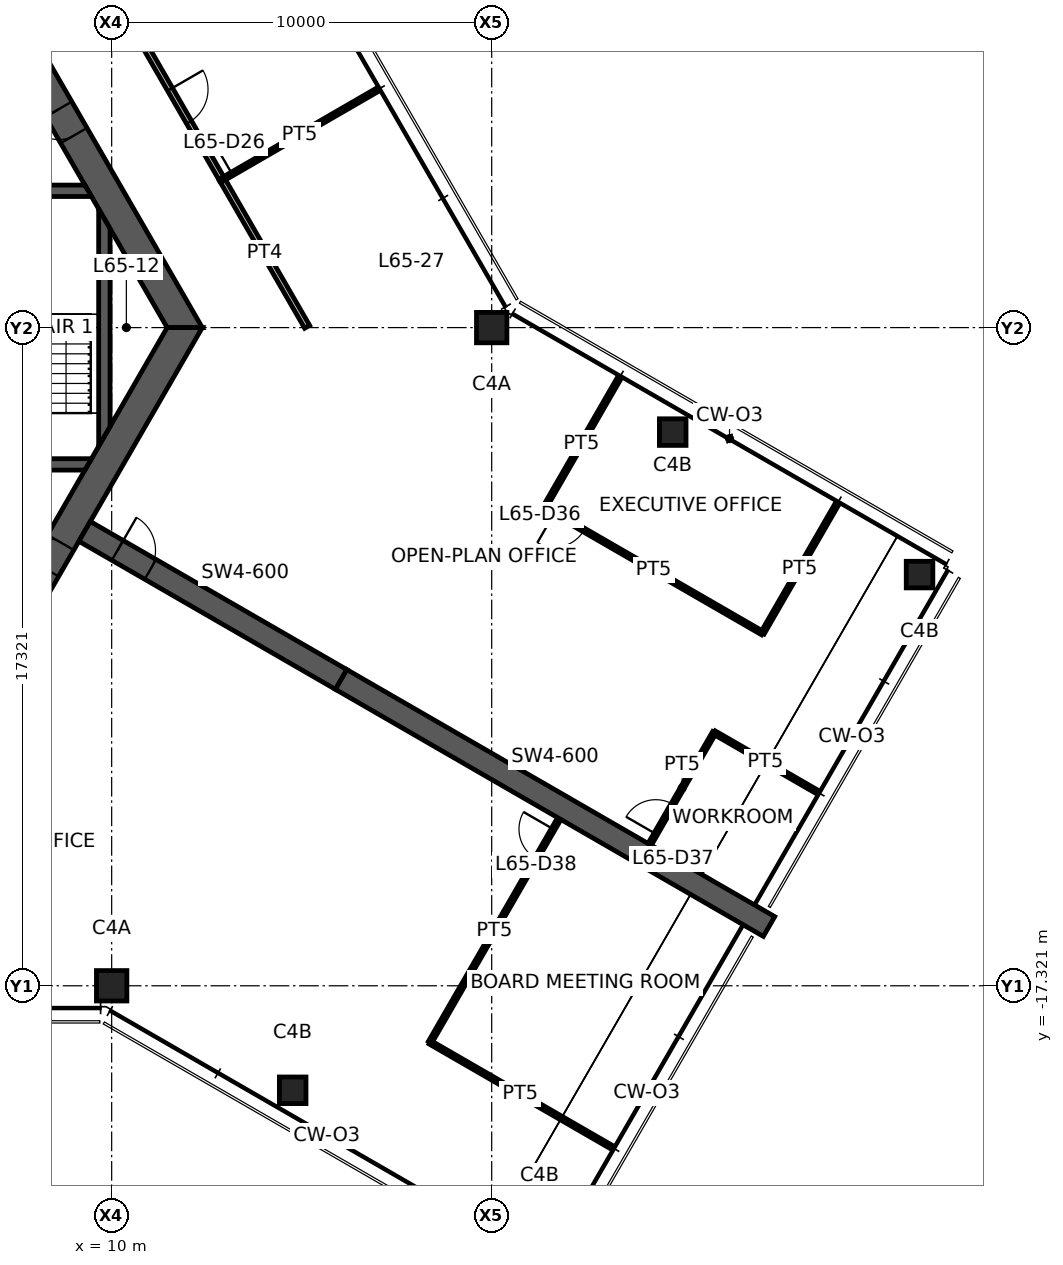
"""IFC4 building model, lengths in metres.
Left out: names, types, materials, properties, quantities, classifications, styles, units other than length and angle.
Written with IfcOpenShell. Run it as: python <this file> out.ifc"""

import sys

from ifc_helpers import new_model, si_unit, direction, frame, frame_2d, origin, origin_2d, place, context, subcontext, project, spatial, polyline, rectangle, hollow_rectangle, outline, extrude, element, fill, save


model = new_model("IFC4")
c1 = context("Model", 3, precision=1e-05, world=origin(), true_north=direction((0.0, 1.0)))
c2 = subcontext(c1, "Body", "Model", "MODEL_VIEW")
j1 = project(units=[si_unit("LENGTHUNIT", "METRE"), si_unit("PLANEANGLEUNIT", "RADIAN")], contexts=[c1])
p1 = place(None, origin())
s1 = spatial("IfcSite", under=j1, at=p1, CompositionType="ELEMENT")
p2 = place(p1, origin())
s2 = spatial("IfcBuilding", under=s1, at=p2, CompositionType="ELEMENT")
p3 = place(p2, frame((0.0, 0.0, 259.6)))
s3 = spatial("IfcBuildingStorey", under=s2, at=p3, CompositionType="ELEMENT", Elevation=259.6)
for number, where, z_axis, x_axis in (
    (1, (20.0, 0.0, 0.0), (0.0, 0.0, 1.0), (1.0, 0.0, 0.0)),
    (2, (10.0, -17.321, 0.0), (0.0, 0.0, 1.0), (1.0, 0.0, 0.0)),
):
    element("IfcColumn", number, at=place(p3, frame(where, z_axis=z_axis, x_axis=x_axis)), inside=s3, PredefinedType="COLUMN", context=c2, shape_type="SweptSolid", body=[
        extrude(hollow_rectangle(XDim=0.8, YDim=0.8, WallThickness=0.04, at=origin_2d()), origin(), (0.0, 0.0, 1.0), 3.9),
    ])
for number, where, z_axis, x_axis in (
    (3, (14.763, -20.071, 0.0), (0.0, 0.0, 1.0), (1.0, 0.0, 0.0)),
    (4, (24.763, -2.75, 0.0), (0.0, 0.0, 1.0), (1.0, 0.0, 0.0)),
    (5, (31.258, -6.5, 0.0), (0.0, 0.0, 1.0), (1.0, 0.0, 0.0)),
):
    element("IfcColumn", number, at=place(p3, frame(where, z_axis=z_axis, x_axis=x_axis)), inside=s3, PredefinedType="COLUMN", context=c2, shape_type="SweptSolid", body=[
        extrude(hollow_rectangle(XDim=0.7, YDim=0.7, WallThickness=0.032, at=origin_2d()), origin(), (0.0, 0.0, 1.0), 3.9),
    ])
p4 = place(p3, frame((11.922, 0.0, 0.0), z_axis=(0.0, 0.0, 1.0), x_axis=(-0.500004296715, 0.866022923061, 0.0)))
e6 = element("IfcWall", 6, at=p4, inside=s3, PredefinedType="SHEAR", context=c2, shape_type="SweptSolid", body=[
    extrude(outline(polyline([(-0.231, -0.4), (5.835, -0.4), (6.635, -0.4), (12.153, -0.4), (11.691, 0.4), (6.635, 0.4), (5.835, 0.4), (0.231, 0.4), (-0.231, -0.4)])), origin(), (0.0, 0.0, 1.0), 3.9),
])
p5 = place(p4, frame((5.835, 0.0, 0.0)))
e7 = element("IfcOpeningElement", 7, at=p5, cuts=e6, PredefinedType="OPENING", context=c2, shape_type="SweptSolid", body=[
    extrude(rectangle(XDim=0.8, YDim=2.1, at=frame_2d((0.4, 1.05))), frame((0.0, 0.41, 0.0), z_axis=(0.0, -1.0, 0.0), x_axis=(1.0, 0.0, 0.0)), (0.0, 0.0, 1.0), 0.82),
])
p6 = place(p3, frame((5.961, -10.325, 0.0), z_axis=(0.0, 0.0, 1.0), x_axis=(0.500004296715, 0.866022923061, 0.0)))
e8 = element("IfcWall", 8, at=p6, inside=s3, PredefinedType="SHEAR", context=c2, shape_type="SweptSolid", body=[
    extrude(outline(polyline([(-0.231, -0.4), (4.594, -0.4), (5.394, -0.4), (12.153, -0.4), (11.691, 0.4), (5.394, 0.4), (4.594, 0.4), (0.231, 0.4), (-0.231, -0.4)])), origin(), (0.0, 0.0, 1.0), 3.9),
])
p7 = place(p6, frame((4.594, 0.0, 0.0)))
e9 = element("IfcOpeningElement", 9, at=p7, cuts=e8, PredefinedType="OPENING", context=c2, shape_type="SweptSolid", body=[
    extrude(rectangle(XDim=0.8, YDim=2.1, at=frame_2d((0.4, 1.05))), frame((0.0, 0.41, 0.0), z_axis=(0.0, -1.0, 0.0), x_axis=(1.0, 0.0, 0.0)), (0.0, 0.0, 1.0), 0.82),
])
p8 = place(p3, frame((9.288, -5.363, 0.0), z_axis=(0.0, 0.0, 1.0), x_axis=(0.866031736626, -0.499989031036, 0.0)))
e10 = element("IfcWall", 10, at=p8, inside=s3, PredefinedType="SHEAR", context=c2, shape_type="SweptSolid", body=[
    extrude(rectangle(XDim=7.796, YDim=0.6, at=frame_2d((3.898, 0.0))), origin(), (0.0, 0.0, 1.0), 3.9),
])
p9 = place(p8, frame((1.0, 0.0, 0.0)))
e11 = element("IfcOpeningElement", 11, at=p9, cuts=e10, PredefinedType="OPENING", context=c2, shape_type="SweptSolid", body=[
    extrude(rectangle(XDim=1.0, YDim=2.1, at=frame_2d((0.5, 1.05))), frame((0.0, 0.31, 0.0), z_axis=(0.0, -1.0, 0.0), x_axis=(1.0, 0.0, 0.0)), (0.0, 0.0, 1.0), 0.62),
])
p10 = place(p3, frame((16.039, -9.26, 0.0), z_axis=(0.0, 0.0, 1.0), x_axis=(0.866024837091, -0.50000098154, 0.0)))
e12 = element("IfcWall", 12, at=p10, inside=s3, PredefinedType="SHEAR", context=c2, shape_type="SweptSolid", body=[
    extrude(rectangle(XDim=13.0, YDim=0.6, at=frame_2d((6.5, 0.0))), origin(), (0.0, 0.0, 1.0), 3.9),
])
p11 = place(p3, frame((1.45, 3.6, 0.0), z_axis=(0.0, 0.0, 1.0), x_axis=(1.0, 0.0, 0.0)))
e13 = element("IfcWall", 13, at=p11, inside=s3, PredefinedType="SHEAR", context=c2, shape_type="SweptSolid", body=[
    extrude(outline(polyline([(0.0, -0.15), (1.15, -0.15), (2.05, -0.15), (3.4, -0.15), (4.7, -0.15), (8.019, -0.15), (7.845, 0.15), (4.7, 0.15), (3.4, 0.15), (2.05, 0.15), (1.15, 0.15), (0.0, 0.15), (0.0, -0.15)])), origin(), (0.0, 0.0, 1.0), 3.9),
])
p12 = place(p11, frame((1.15, 0.0, 0.0)))
e14 = element("IfcOpeningElement", 14, at=p12, cuts=e13, PredefinedType="OPENING", context=c2, shape_type="SweptSolid", body=[
    extrude(rectangle(XDim=0.9, YDim=2.1, at=frame_2d((0.45, 1.05))), frame((0.0, 0.16, 0.0), z_axis=(0.0, -1.0, 0.0), x_axis=(1.0, 0.0, 0.0)), (0.0, 0.0, 1.0), 0.32),
])
p13 = place(p11, frame((3.4, 0.0, 0.0)))
e15 = element("IfcOpeningElement", 15, at=p13, cuts=e13, PredefinedType="OPENING", context=c2, shape_type="SweptSolid", body=[
    extrude(rectangle(XDim=1.3, YDim=2.1, at=frame_2d((0.65, 1.05))), frame((0.0, 0.16, 0.0), z_axis=(0.0, -1.0, 0.0), x_axis=(1.0, 0.0, 0.0)), (0.0, 0.0, 1.0), 0.32),
])
p14 = place(p3, frame((1.45, -3.6, 0.0), z_axis=(0.0, 0.0, 1.0), x_axis=(1.0, 0.0, 0.0)))
e16 = element("IfcWall", 16, at=p14, inside=s3, PredefinedType="SHEAR", context=c2, shape_type="SweptSolid", body=[
    extrude(outline(polyline([(0.0, -0.15), (1.05, -0.15), (2.15, -0.15), (7.845, -0.15), (8.019, 0.15), (2.15, 0.15), (1.05, 0.15), (0.0, 0.15), (0.0, -0.15)])), origin(), (0.0, 0.0, 1.0), 3.9),
])
p15 = place(p14, frame((1.05, 0.0, 0.0)))
e17 = element("IfcOpeningElement", 17, at=p15, cuts=e16, PredefinedType="OPENING", context=c2, shape_type="SweptSolid", body=[
    extrude(rectangle(XDim=1.1, YDim=2.1, at=frame_2d((0.55, 1.05))), frame((0.0, 0.16, 0.0), z_axis=(0.0, -1.0, 0.0), x_axis=(1.0, 0.0, 0.0)), (0.0, 0.0, 1.0), 0.32),
])
p16 = place(p3, frame((9.808, -2.862, 0.0), z_axis=(0.0, 0.0, 1.0), x_axis=(0.0, 1.0, 0.0)))
e18 = element("IfcWall", 18, at=p16, inside=s3, PredefinedType="SHEAR", context=c2, shape_type="SweptSolid", body=[
    extrude(outline(polyline([(0.26, -0.15), (5.465, -0.15), (5.984, 0.15), (-0.26, 0.15), (0.26, -0.15)])), origin(), (0.0, 0.0, 1.0), 3.9),
])
p17 = place(p3, frame((12.903, 3.902, 0.0), z_axis=(0.0, 0.0, 1.0), x_axis=(0.499964488425, -0.866045905431, 0.0)))
e19 = element("IfcWall", 19, at=p17, inside=s3, PredefinedType="PARTITIONING", context=c2, shape_type="SweptSolid", body=[
    extrude(rectangle(XDim=4.482, YDim=0.15, at=frame_2d((2.241, 0.0))), origin(), (0.0, 0.0, 1.0), 2.95),
])
p18 = place(p3, frame((10.664, 7.779, 0.0), z_axis=(0.0, 0.0, 1.0), x_axis=(0.500001951578, -0.866024277037, 0.0)))
e20 = element("IfcWall", 20, at=p18, inside=s3, PredefinedType="PARTITIONING", context=c2, shape_type="SweptSolid", body=[
    extrude(rectangle(XDim=4.486, YDim=0.15, at=frame_2d((2.243, 0.0))), origin(), (0.0, 0.0, 1.0), 2.95),
])
p19 = place(p18, frame((1.743, 0.0, 0.0)))
e21 = element("IfcOpeningElement", 21, at=p19, cuts=e20, PredefinedType="OPENING", context=c2, shape_type="SweptSolid", body=[
    extrude(rectangle(XDim=1.0, YDim=2.1, at=frame_2d((0.5, 1.05))), frame((0.0, 0.085, 0.0), z_axis=(0.0, -1.0, 0.0), x_axis=(1.0, 0.0, 0.0)), (0.0, 0.0, 1.0), 0.17),
])
p20 = place(p3, frame((12.907, 3.894, 0.0), z_axis=(0.0, 0.0, 1.0), x_axis=(0.86555176604, 0.500819468776, 0.0)))
e22 = element("IfcWall", 22, at=p20, inside=s3, PredefinedType="PARTITIONING", context=c2, shape_type="SweptSolid", body=[
    extrude(rectangle(XDim=4.706, YDim=0.1, at=frame_2d((2.353, 0.0))), origin(), (0.0, 0.0, 1.0), 2.95),
])
p21 = place(p20, frame((0.3, 0.0, 0.0)))
e23 = element("IfcOpeningElement", 23, at=p21, cuts=e22, PredefinedType="OPENING", context=c2, shape_type="SweptSolid", body=[
    extrude(rectangle(XDim=0.9, YDim=2.1, at=frame_2d((0.45, 1.05))), frame((0.0, 0.06, 0.0), z_axis=(0.0, -1.0, 0.0), x_axis=(1.0, 0.0, 0.0)), (0.0, 0.0, 1.0), 0.12),
])
p22 = place(p3, frame((21.392, -4.73, 0.0), z_axis=(0.0, 0.0, 1.0), x_axis=(0.500043804875, 0.866000111551, 0.0)))
e24 = element("IfcWall", 24, at=p22, inside=s3, PredefinedType="PARTITIONING", context=c2, shape_type="SweptSolid", body=[
    extrude(rectangle(XDim=3.88, YDim=0.1, at=frame_2d((1.94, 0.0))), origin(), (0.0, 0.0, 1.0), 2.95),
])
p23 = place(p3, frame((27.125, -8.04, 0.0), z_axis=(0.0, 0.0, 1.0), x_axis=(-0.866030817826, 0.499990622488, 0.0)))
e25 = element("IfcWall", 25, at=p23, inside=s3, PredefinedType="PARTITIONING", context=c2, shape_type="SweptSolid", body=[
    extrude(rectangle(XDim=6.62, YDim=0.1, at=frame_2d((3.31, 0.0))), origin(), (0.0, 0.0, 1.0), 2.95),
])
p24 = place(p23, frame((5.42, 0.0, 0.0)))
e26 = element("IfcOpeningElement", 26, at=p24, cuts=e25, PredefinedType="OPENING", context=c2, shape_type="SweptSolid", body=[
    extrude(rectangle(XDim=0.9, YDim=2.1, at=frame_2d((0.45, 1.05))), frame((0.0, 0.06, 0.0), z_axis=(0.0, -1.0, 0.0), x_axis=(1.0, 0.0, 0.0)), (0.0, 0.0, 1.0), 0.12),
])
p25 = place(p3, frame((29.08, -4.653, 0.0), z_axis=(0.0, 0.0, 1.0), x_axis=(-0.500007107024, -0.866021300503, 0.0)))
e27 = element("IfcWall", 27, at=p25, inside=s3, PredefinedType="PARTITIONING", context=c2, shape_type="SweptSolid", body=[
    extrude(rectangle(XDim=3.91, YDim=0.1, at=frame_2d((1.955, 0.0))), origin(), (0.0, 0.0, 1.0), 2.95),
])
p26 = place(p3, frame((24.167, -13.583, 0.0), z_axis=(0.0, 0.0, 1.0), x_axis=(0.500007997579, 0.866020786331, 0.0)))
e28 = element("IfcWall", 28, at=p26, inside=s3, PredefinedType="PARTITIONING", context=c2, shape_type="SweptSolid", body=[
    extrude(rectangle(XDim=3.38, YDim=0.1, at=frame_2d((1.69, 0.0))), origin(), (0.0, 0.0, 1.0), 2.95),
])
p27 = place(p26, frame((0.3, 0.0, 0.0)))
e29 = element("IfcOpeningElement", 29, at=p27, cuts=e28, PredefinedType="OPENING", context=c2, shape_type="SweptSolid", body=[
    extrude(rectangle(XDim=0.9, YDim=2.1, at=frame_2d((0.45, 1.05))), frame((0.0, 0.06, 0.0), z_axis=(0.0, -1.0, 0.0), x_axis=(1.0, 0.0, 0.0)), (0.0, 0.0, 1.0), 0.12),
])
p28 = place(p3, frame((25.857, -10.656, 0.0), z_axis=(0.0, 0.0, 1.0), x_axis=(0.866036558865, -0.499980678337, 0.0)))
e30 = element("IfcWall", 30, at=p28, inside=s3, PredefinedType="PARTITIONING", context=c2, shape_type="SweptSolid", body=[
    extrude(rectangle(XDim=3.11, YDim=0.1, at=frame_2d((1.555, 0.0))), origin(), (0.0, 0.0, 1.0), 2.95),
])
p29 = place(p3, frame((18.378, -18.809, 0.0), z_axis=(0.0, 0.0, 1.0), x_axis=(0.500019607421, 0.866014083139, 0.0)))
e31 = element("IfcWall", 31, at=p29, inside=s3, PredefinedType="PARTITIONING", context=c2, shape_type="SweptSolid", body=[
    extrude(rectangle(XDim=6.78, YDim=0.1, at=frame_2d((3.39, 0.0))), origin(), (0.0, 0.0, 1.0), 2.95),
])
p30 = place(p29, frame((5.58, 0.0, 0.0)))
e32 = element("IfcOpeningElement", 32, at=p30, cuts=e31, PredefinedType="OPENING", context=c2, shape_type="SweptSolid", body=[
    extrude(rectangle(XDim=0.9, YDim=2.1, at=frame_2d((0.45, 1.05))), frame((0.0, 0.06, 0.0), z_axis=(0.0, -1.0, 0.0), x_axis=(1.0, 0.0, 0.0)), (0.0, 0.0, 1.0), 0.12),
])
p31 = place(p3, frame((23.124, -21.549, 0.0), z_axis=(0.0, 0.0, 1.0), x_axis=(-0.866027562125, 0.499996261625, 0.0)))
e33 = element("IfcWall", 33, at=p31, inside=s3, PredefinedType="PARTITIONING", context=c2, shape_type="SweptSolid", body=[
    extrude(rectangle(XDim=5.48, YDim=0.1, at=frame_2d((2.74, 0.0))), origin(), (0.0, 0.0, 1.0), 2.95),
])
p32 = place(p5, origin())
e34 = element("IfcDoor", 34, at=p32, inside=s3, OperationType="SINGLE_SWING_RIGHT", PredefinedType="DOOR", context=c2, shape_type="SweptSolid", body=[
    extrude(rectangle(XDim=0.8, YDim=2.1, at=frame_2d((0.4, 1.05))), frame((0.0, 0.025, 0.0), z_axis=(0.0, -1.0, 0.0), x_axis=(1.0, 0.0, 0.0)), (0.0, 0.0, 1.0), 0.05),
])
fill(e7, e34)
p33 = place(p7, origin())
e35 = element("IfcDoor", 35, at=p33, inside=s3, OperationType="SINGLE_SWING_LEFT", PredefinedType="DOOR", context=c2, shape_type="SweptSolid", body=[
    extrude(rectangle(XDim=0.8, YDim=2.1, at=frame_2d((0.4, 1.05))), frame((0.0, 0.025, 0.0), z_axis=(0.0, -1.0, 0.0), x_axis=(1.0, 0.0, 0.0)), (0.0, 0.0, 1.0), 0.05),
])
fill(e9, e35)
p34 = place(p9, origin())
e36 = element("IfcDoor", 36, at=p34, inside=s3, OperationType="SINGLE_SWING_LEFT", PredefinedType="DOOR", context=c2, shape_type="SweptSolid", body=[
    extrude(rectangle(XDim=1.0, YDim=2.1, at=frame_2d((0.5, 1.05))), frame((0.0, 0.025, 0.0), z_axis=(0.0, -1.0, 0.0), x_axis=(1.0, 0.0, 0.0)), (0.0, 0.0, 1.0), 0.05),
])
fill(e11, e36)
p35 = place(p19, origin())
e37 = element("IfcDoor", 37, at=p35, inside=s3, OperationType="SINGLE_SWING_LEFT", PredefinedType="DOOR", context=c2, shape_type="SweptSolid", body=[
    extrude(rectangle(XDim=1.0, YDim=2.1, at=frame_2d((0.5, 1.05))), frame((0.0, 0.025, 0.0), z_axis=(0.0, -1.0, 0.0), x_axis=(1.0, 0.0, 0.0)), (0.0, 0.0, 1.0), 0.05),
])
fill(e21, e37)
p36 = place(p21, origin())
e38 = element("IfcDoor", 38, at=p36, inside=s3, OperationType="SINGLE_SWING_LEFT", PredefinedType="DOOR", context=c2, shape_type="SweptSolid", body=[
    extrude(rectangle(XDim=0.9, YDim=2.1, at=frame_2d((0.45, 1.05))), frame((0.0, 0.025, 0.0), z_axis=(0.0, -1.0, 0.0), x_axis=(1.0, 0.0, 0.0)), (0.0, 0.0, 1.0), 0.05),
])
fill(e23, e38)
p37 = place(p24, origin())
e39 = element("IfcDoor", 39, at=p37, inside=s3, OperationType="SINGLE_SWING_RIGHT", PredefinedType="DOOR", context=c2, shape_type="SweptSolid", body=[
    extrude(rectangle(XDim=0.9, YDim=2.1, at=frame_2d((0.45, 1.05))), frame((0.0, 0.025, 0.0), z_axis=(0.0, -1.0, 0.0), x_axis=(1.0, 0.0, 0.0)), (0.0, 0.0, 1.0), 0.05),
])
fill(e26, e39)
p38 = place(p27, origin())
e40 = element("IfcDoor", 40, at=p38, inside=s3, OperationType="SINGLE_SWING_LEFT", PredefinedType="DOOR", context=c2, shape_type="SweptSolid", body=[
    extrude(rectangle(XDim=0.9, YDim=2.1, at=frame_2d((0.45, 1.05))), frame((0.0, 0.025, 0.0), z_axis=(0.0, -1.0, 0.0), x_axis=(1.0, 0.0, 0.0)), (0.0, 0.0, 1.0), 0.05),
])
fill(e29, e40)
p39 = place(p30, origin())
e41 = element("IfcDoor", 41, at=p39, inside=s3, OperationType="SINGLE_SWING_RIGHT", PredefinedType="DOOR", context=c2, shape_type="SweptSolid", body=[
    extrude(rectangle(XDim=0.9, YDim=2.1, at=frame_2d((0.45, 1.05))), frame((0.0, 0.025, 0.0), z_axis=(0.0, -1.0, 0.0), x_axis=(1.0, 0.0, 0.0)), (0.0, 0.0, 1.0), 0.05),
])
fill(e32, e41)
save(model, sys.argv[1])
